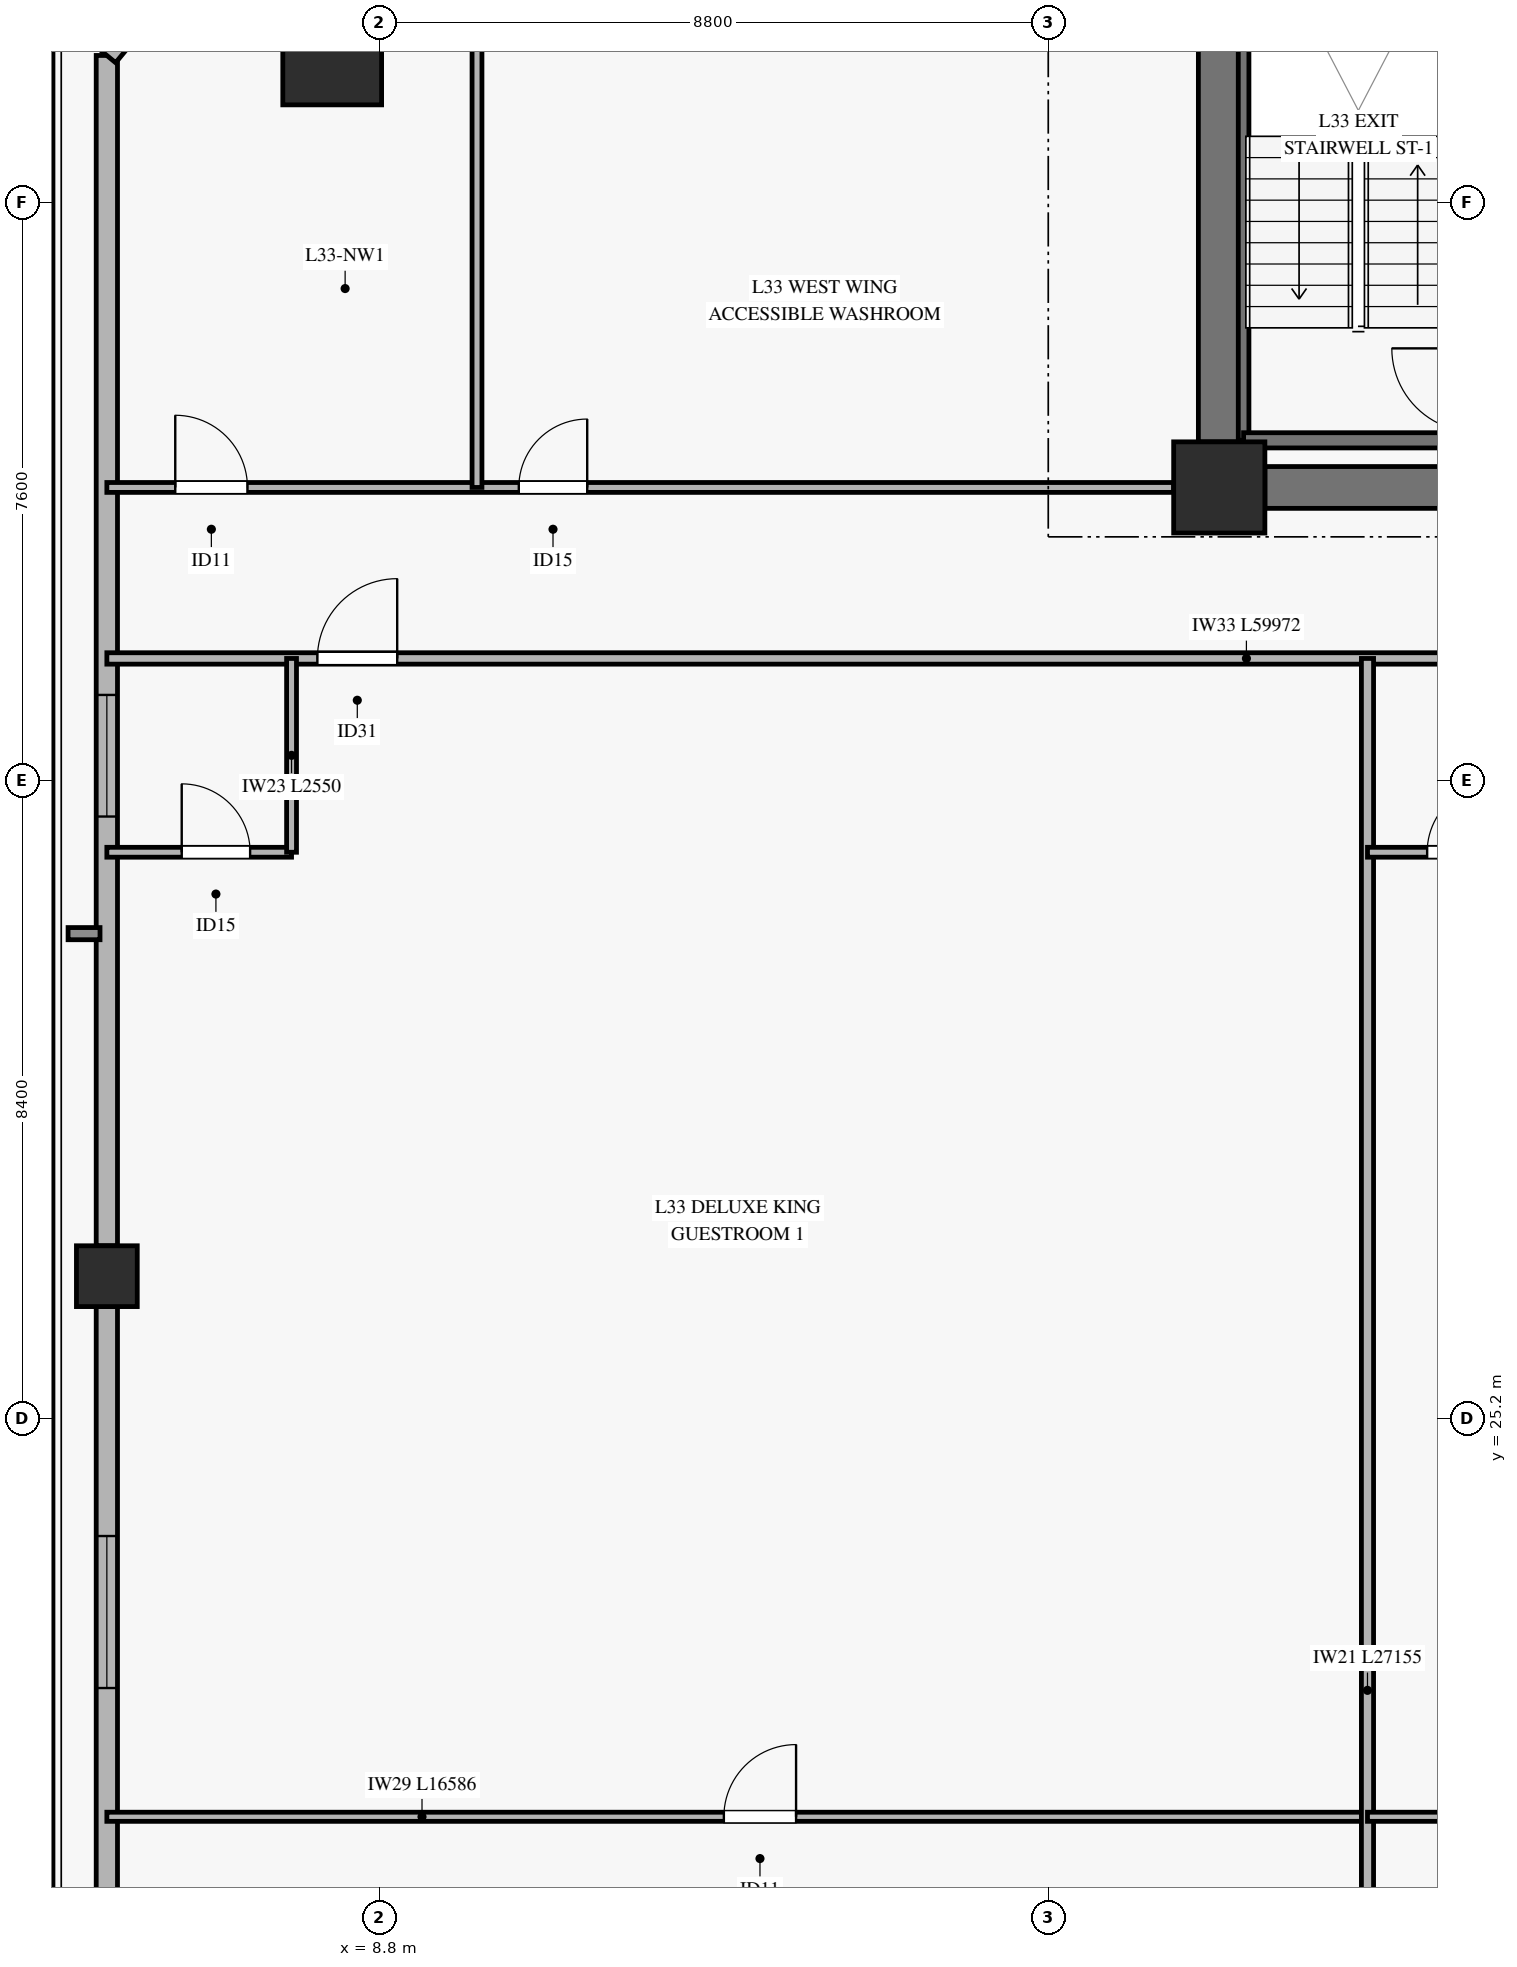
"""IFC4 building model, lengths in metres.
Left out: names, types, materials, properties, quantities, classifications, styles, units other than length and angle.
Written with IfcOpenShell. Run it as: python <this file> out.ifc"""

import sys

from ifc_helpers import new_model, si_unit, direction, frame, frame_2d, origin, origin_2d, place, context, subcontext, project, spatial, rectangle, hollow_rectangle, extrude, source, transform, mapped, element, fill, save


model = new_model("IFC4")
c1 = context("Model", 3, precision=1e-05, world=origin(), true_north=direction((0.0, 1.0)))
c2 = subcontext(c1, "Body", "Model", "MODEL_VIEW")
j1 = project(units=[si_unit("LENGTHUNIT", "METRE"), si_unit("PLANEANGLEUNIT", "RADIAN")], contexts=[c1])
p1 = place(None, origin())
s1 = spatial("IfcSite", under=j1, at=p1, CompositionType="ELEMENT")
p2 = place(p1, origin())
s2 = spatial("IfcBuilding", under=s1, at=p2, CompositionType="ELEMENT")
p3 = place(p2, frame((0.0, 0.0, 137.7)))
s3 = spatial("IfcBuildingStorey", under=s2, at=p3, CompositionType="ELEMENT", Elevation=137.7)
m1 = source(origin(), c2, "Body", "SweptSolid", [
    extrude(rectangle(XDim=1.2, YDim=1.2, at=origin_2d()), origin(), (0.0, 0.0, 1.0), 3.27),
])
p4 = place(p3, frame((19.85, 37.45, 0.0), z_axis=(0.0, 0.0, 1.0), x_axis=(1.0, 0.0, 0.0)))
e1 = element("IfcColumn", 1, at=p4, inside=s3, PredefinedType="PILASTER", context=c2, shape_type="MappedRepresentation", body=[
    mapped(m1, transform((0.0, 0.0, 0.0), x_axis=(1.0, 0.0, 0.0), y_axis=(0.0, 1.0, 0.0), z_axis=(0.0, 0.0, 1.0), scale=1.0)),
])
p5 = place(p3, frame((20.45, 37.45, 0.0), z_axis=(0.0, 0.0, 1.0), x_axis=(1.0, 0.0, 0.0)))
e2 = element("IfcWall", 2, at=p5, inside=s3, PredefinedType="SHEAR", context=c2, shape_type="SweptSolid", body=[
    extrude(rectangle(XDim=9.75, YDim=0.55, at=frame_2d((4.875, 0.0))), origin(), (0.0, 0.0, 1.0), 3.27),
])
p6 = place(p5, frame((4.1, 0.0, 0.0)))
e3 = element("IfcOpeningElement", 3, at=p6, cuts=e2, PredefinedType="OPENING", context=c2, shape_type="SweptSolid", body=[
    extrude(rectangle(XDim=1.2, YDim=2.15, at=frame_2d((0.6, 1.075))), frame((0.0, 0.285, 0.0), z_axis=(0.0, -1.0, 0.0), x_axis=(1.0, 0.0, 0.0)), (0.0, 0.0, 1.0), 0.57),
])
p7 = place(p3, frame((19.85, 38.05, 0.0), z_axis=(0.0, 0.0, 1.0), x_axis=(0.0, 1.0, 0.0)))
e4 = element("IfcWall", 4, at=p7, inside=s3, PredefinedType="SHEAR", context=c2, shape_type="SweptSolid", body=[
    extrude(rectangle(XDim=7.9, YDim=0.55, at=frame_2d((3.95, 0.0))), origin(), (0.0, 0.0, 1.0), 3.27),
])
m2 = source(origin(), c2, "Body", "SweptSolid", [
    extrude(hollow_rectangle(XDim=1.3, YDim=1.3, WallThickness=0.06, at=origin_2d()), origin(), (0.0, 0.0, 1.0), 3.27),
])
p8 = place(p3, frame((8.179, 43.134, 0.0), z_axis=(0.0, 0.0, 1.0), x_axis=(1.0, 0.0, 0.0)))
e5 = element("IfcColumn", 5, at=p8, inside=s3, PredefinedType="COLUMN", context=c2, shape_type="MappedRepresentation", body=[
    mapped(m2, transform((0.0, 0.0, 0.0), x_axis=(1.0, 0.0, 0.0), y_axis=(0.0, 1.0, 0.0), z_axis=(0.0, 0.0, 1.0), scale=1.0)),
])
m3 = source(origin(), c2, "Body", "SweptSolid", [
    extrude(hollow_rectangle(XDim=0.8, YDim=0.8, WallThickness=0.036, at=origin_2d()), origin(), (0.0, 0.0, 1.0), 3.27),
])
p9 = place(p3, frame((5.214, 27.072, 0.0), z_axis=(0.0, 0.0, 1.0), x_axis=(1.0, 0.0, 0.0)))
e6 = element("IfcColumn", 6, at=p9, inside=s3, PredefinedType="COLUMN", context=c2, shape_type="MappedRepresentation", body=[
    mapped(m3, transform((0.0, 0.0, 0.0), x_axis=(1.0, 0.0, 0.0), y_axis=(0.0, 1.0, 0.0), z_axis=(0.0, 0.0, 1.0), scale=1.0)),
])
p10 = place(p3, frame((5.214, 11.01, 0.0), z_axis=(0.0, 0.0, 1.0), x_axis=(0.0, 1.0, 0.0)))
e7 = element("IfcWall", 7, at=p10, inside=s3, PredefinedType="SOLIDWALL", context=c2, shape_type="SweptSolid", body=[
    extrude(rectangle(XDim=15.662, YDim=0.28, at=frame_2d((7.831, 0.0))), origin(), (0.0, 0.0, 1.0), 2.75),
])
p11 = place(p10, frame((3.312, 0.0, 0.45)))
e8 = element("IfcOpeningElement", 8, at=p11, cuts=e7, PredefinedType="OPENING", context=c2, shape_type="SweptSolid", body=[
    extrude(rectangle(XDim=2.0, YDim=2.0, at=frame_2d((1.0, 1.0))), frame((0.0, 0.15, 0.0), z_axis=(0.0, -1.0, 0.0), x_axis=(1.0, 0.0, 0.0)), (0.0, 0.0, 1.0), 0.3),
])
p12 = place(p10, frame((10.643, 0.0, 0.45)))
e9 = element("IfcOpeningElement", 9, at=p12, cuts=e7, PredefinedType="OPENING", context=c2, shape_type="SweptSolid", body=[
    extrude(rectangle(XDim=2.0, YDim=2.0, at=frame_2d((1.0, 1.0))), frame((0.0, 0.15, 0.0), z_axis=(0.0, -1.0, 0.0), x_axis=(1.0, 0.0, 0.0)), (0.0, 0.0, 1.0), 0.3),
])
p13 = place(p3, frame((5.214, 27.472, 0.0), z_axis=(0.0, 0.0, 1.0), x_axis=(0.0, 1.0, 0.0)))
e10 = element("IfcWall", 10, at=p13, inside=s3, PredefinedType="SOLIDWALL", context=c2, shape_type="SweptSolid", body=[
    extrude(rectangle(XDim=15.662, YDim=0.28, at=frame_2d((7.831, 0.0))), origin(), (0.0, 0.0, 1.0), 2.75),
])
p14 = place(p13, frame((5.648, 0.0, 0.45)))
e11 = element("IfcOpeningElement", 11, at=p14, cuts=e10, PredefinedType="OPENING", context=c2, shape_type="SweptSolid", body=[
    extrude(rectangle(XDim=1.6, YDim=2.0, at=frame_2d((0.8, 1.0))), frame((0.0, 0.15, 0.0), z_axis=(0.0, -1.0, 0.0), x_axis=(1.0, 0.0, 0.0)), (0.0, 0.0, 1.0), 0.3),
])
p15 = place(p3, frame((7.779, 46.25, 0.0), z_axis=(0.0, 0.0, 1.0), x_axis=(-0.63553760815, -0.772069911748, 0.0)))
e12 = element("IfcWall", 12, at=p15, inside=s3, PredefinedType="SOLIDWALL", context=c2, shape_type="SweptSolid", body=[
    extrude(rectangle(XDim=4.036, YDim=0.3, at=frame_2d((2.018, 0.0))), origin(), (0.0, 0.0, 1.0), 2.75),
])
p16 = place(p15, frame((1.218, 0.0, 0.45)))
e13 = element("IfcOpeningElement", 13, at=p16, cuts=e12, PredefinedType="OPENING", context=c2, shape_type="SweptSolid", body=[
    extrude(rectangle(XDim=1.6, YDim=2.0, at=frame_2d((0.8, 1.0))), frame((0.0, 0.16, 0.0), z_axis=(0.0, -1.0, 0.0), x_axis=(1.0, 0.0, 0.0)), (0.0, 0.0, 1.0), 0.32),
])
p17 = place(p3, frame((20.17, 38.07, 0.0), z_axis=(0.0, 0.0, 1.0), x_axis=(0.0, 1.0, 0.0)))
e14 = element("IfcWall", 14, at=p17, inside=s3, PredefinedType="SOLIDWALL", context=c2, shape_type="SweptSolid", body=[
    extrude(rectangle(XDim=7.25, YDim=0.14, at=frame_2d((3.625, 0.0))), origin(), (0.0, 0.0, 1.0), 3.5),
])
p18 = place(p3, frame((20.17, 38.07, 0.0), z_axis=(0.0, 0.0, 1.0), x_axis=(1.0, 0.0, 0.0)))
e15 = element("IfcWall", 15, at=p18, inside=s3, PredefinedType="SOLIDWALL", context=c2, shape_type="SweptSolid", body=[
    extrude(rectangle(XDim=3.05, YDim=0.2, at=frame_2d((1.525, 0.0))), origin(), (0.0, 0.0, 1.0), 3.5),
])
p19 = place(p3, frame((5.214, 35.2, 0.0), z_axis=(0.0, 0.0, 1.0), x_axis=(1.0, 0.0, 0.0)))
e16 = element("IfcWall", 16, at=p19, inside=s3, PredefinedType="PARTITIONING", context=c2, shape_type="SweptSolid", body=[
    extrude(rectangle(XDim=59.972, YDim=0.15, at=frame_2d((29.986, 0.0))), origin(), (0.0, 0.0, 1.0), 2.455),
])
p20 = place(p19, frame((2.77, 0.0, 0.0)))
e17 = element("IfcOpeningElement", 17, at=p20, cuts=e16, PredefinedType="OPENING", context=c2, shape_type="SweptSolid", body=[
    extrude(rectangle(XDim=1.05, YDim=2.15, at=frame_2d((0.525, 1.075))), frame((0.0, 0.085, 0.0), z_axis=(0.0, -1.0, 0.0), x_axis=(1.0, 0.0, 0.0)), (0.0, 0.0, 1.0), 0.17),
])
p21 = place(p19, frame((19.156, 0.0, 0.0)))
e18 = element("IfcOpeningElement", 18, at=p21, cuts=e16, PredefinedType="OPENING", context=c2, shape_type="SweptSolid", body=[
    extrude(rectangle(XDim=1.05, YDim=2.15, at=frame_2d((0.525, 1.075))), frame((0.0, 0.085, 0.0), z_axis=(0.0, -1.0, 0.0), x_axis=(1.0, 0.0, 0.0)), (0.0, 0.0, 1.0), 0.17),
])
p22 = place(p19, frame((24.662, 0.0, 0.0)))
e19 = element("IfcOpeningElement", 19, at=p22, cuts=e16, PredefinedType="OPENING", context=c2, shape_type="SweptSolid", body=[
    extrude(rectangle(XDim=1.05, YDim=2.15, at=frame_2d((0.525, 1.075))), frame((0.0, 0.085, 0.0), z_axis=(0.0, -1.0, 0.0), x_axis=(1.0, 0.0, 0.0)), (0.0, 0.0, 1.0), 0.17),
])
p23 = place(p19, frame((29.462, 0.0, 0.0)))
e20 = element("IfcOpeningElement", 20, at=p23, cuts=e16, PredefinedType="OPENING", context=c2, shape_type="SweptSolid", body=[
    extrude(rectangle(XDim=1.05, YDim=2.15, at=frame_2d((0.525, 1.075))), frame((0.0, 0.085, 0.0), z_axis=(0.0, -1.0, 0.0), x_axis=(1.0, 0.0, 0.0)), (0.0, 0.0, 1.0), 0.17),
])
p24 = place(p19, frame((34.262, 0.0, 0.0)))
e21 = element("IfcOpeningElement", 21, at=p24, cuts=e16, PredefinedType="OPENING", context=c2, shape_type="SweptSolid", body=[
    extrude(rectangle(XDim=1.05, YDim=2.15, at=frame_2d((0.525, 1.075))), frame((0.0, 0.085, 0.0), z_axis=(0.0, -1.0, 0.0), x_axis=(1.0, 0.0, 0.0)), (0.0, 0.0, 1.0), 0.17),
])
p25 = place(p19, frame((38.806, 0.0, 0.0)))
e22 = element("IfcOpeningElement", 22, at=p25, cuts=e16, PredefinedType="OPENING", context=c2, shape_type="SweptSolid", body=[
    extrude(rectangle(XDim=1.05, YDim=2.15, at=frame_2d((0.525, 1.075))), frame((0.0, 0.085, 0.0), z_axis=(0.0, -1.0, 0.0), x_axis=(1.0, 0.0, 0.0)), (0.0, 0.0, 1.0), 0.17),
])
p26 = place(p19, frame((42.956, 0.0, 0.0)))
e23 = element("IfcOpeningElement", 23, at=p26, cuts=e16, PredefinedType="OPENING", context=c2, shape_type="SweptSolid", body=[
    extrude(rectangle(XDim=1.05, YDim=2.15, at=frame_2d((0.525, 1.075))), frame((0.0, 0.085, 0.0), z_axis=(0.0, -1.0, 0.0), x_axis=(1.0, 0.0, 0.0)), (0.0, 0.0, 1.0), 0.17),
])
p27 = place(p3, frame((5.214, 32.65, 0.0), z_axis=(0.0, 0.0, 1.0), x_axis=(1.0, 0.0, 0.0)))
e24 = element("IfcWall", 24, at=p27, inside=s3, PredefinedType="PARTITIONING", context=c2, shape_type="SweptSolid", body=[
    extrude(rectangle(XDim=2.43, YDim=0.13, at=frame_2d((1.215, 0.0))), origin(), (0.0, 0.0, 1.0), 2.755),
])
p28 = place(p27, frame((0.985, 0.0, 0.0)))
e25 = element("IfcOpeningElement", 25, at=p28, cuts=e24, PredefinedType="OPENING", context=c2, shape_type="SweptSolid", body=[
    extrude(rectangle(XDim=0.9, YDim=2.1, at=frame_2d((0.45, 1.05))), frame((0.0, 0.075, 0.0), z_axis=(0.0, -1.0, 0.0), x_axis=(1.0, 0.0, 0.0)), (0.0, 0.0, 1.0), 0.15),
])
p29 = place(p3, frame((7.644, 32.65, 0.0), z_axis=(0.0, 0.0, 1.0), x_axis=(0.0, 1.0, 0.0)))
e26 = element("IfcWall", 26, at=p29, inside=s3, PredefinedType="PARTITIONING", context=c2, shape_type="SweptSolid", body=[
    extrude(rectangle(XDim=2.55, YDim=0.13, at=frame_2d((1.275, 0.0))), origin(), (0.0, 0.0, 1.0), 3.27),
])
p30 = place(p3, frame((5.214, 19.959, 0.0), z_axis=(0.0, 0.0, 1.0), x_axis=(1.0, 0.0, 0.0)))
e27 = element("IfcWall", 27, at=p30, inside=s3, PredefinedType="PARTITIONING", context=c2, shape_type="SweptSolid", body=[
    extrude(rectangle(XDim=16.586, YDim=0.12, at=frame_2d((8.293, 0.0))), origin(), (0.0, 0.0, 1.0), 2.455),
])
p31 = place(p30, frame((8.118, 0.0, 0.0)))
e28 = element("IfcOpeningElement", 28, at=p31, cuts=e27, PredefinedType="OPENING", context=c2, shape_type="SweptSolid", body=[
    extrude(rectangle(XDim=0.95, YDim=2.1, at=frame_2d((0.475, 1.05))), frame((0.0, 0.07, 0.0), z_axis=(0.0, -1.0, 0.0), x_axis=(1.0, 0.0, 0.0)), (0.0, 0.0, 1.0), 0.14),
])
p32 = place(p3, frame((21.8, 8.045, 0.0), z_axis=(0.0, 0.0, 1.0), x_axis=(0.0, 1.0, 0.0)))
e29 = element("IfcWall", 29, at=p32, inside=s3, PredefinedType="PARTITIONING", context=c2, shape_type="SweptSolid", body=[
    extrude(rectangle(XDim=27.155, YDim=0.16, at=frame_2d((13.578, 0.0))), origin(), (0.0, 0.0, 1.0), 2.755),
])
p33 = place(p3, frame((21.8, 32.65, 0.0), z_axis=(0.0, 0.0, 1.0), x_axis=(1.0, 0.0, 0.0)))
e30 = element("IfcWall", 30, at=p33, inside=s3, PredefinedType="PARTITIONING", context=c2, shape_type="SweptSolid", body=[
    extrude(rectangle(XDim=2.23, YDim=0.13, at=frame_2d((1.115, 0.0))), origin(), (0.0, 0.0, 1.0), 2.805),
])
p34 = place(p33, frame((0.785, 0.0, 0.0)))
e31 = element("IfcOpeningElement", 31, at=p34, cuts=e30, PredefinedType="OPENING", context=c2, shape_type="SweptSolid", body=[
    extrude(rectangle(XDim=0.9, YDim=2.1, at=frame_2d((0.45, 1.05))), frame((0.0, 0.075, 0.0), z_axis=(0.0, -1.0, 0.0), x_axis=(1.0, 0.0, 0.0)), (0.0, 0.0, 1.0), 0.15),
])
p35 = place(p3, frame((21.8, 19.959, 0.0), z_axis=(0.0, 0.0, 1.0), x_axis=(1.0, 0.0, 0.0)))
e32 = element("IfcWall", 32, at=p35, inside=s3, PredefinedType="PARTITIONING", context=c2, shape_type="SweptSolid", body=[
    extrude(rectangle(XDim=5.8, YDim=0.12, at=frame_2d((2.9, 0.0))), origin(), (0.0, 0.0, 1.0), 3.27),
])
p36 = place(p35, frame((2.625, 0.0, 0.0)))
e33 = element("IfcOpeningElement", 33, at=p36, cuts=e32, PredefinedType="OPENING", context=c2, shape_type="SweptSolid", body=[
    extrude(rectangle(XDim=0.95, YDim=2.1, at=frame_2d((0.475, 1.05))), frame((0.0, 0.07, 0.0), z_axis=(0.0, -1.0, 0.0), x_axis=(1.0, 0.0, 0.0)), (0.0, 0.0, 1.0), 0.14),
])
p37 = place(p3, frame((5.214, 37.45, 0.0), z_axis=(0.0, 0.0, 1.0), x_axis=(1.0, 0.0, 0.0)))
e34 = element("IfcWall", 34, at=p37, inside=s3, PredefinedType="PARTITIONING", context=c2, shape_type="SweptSolid", body=[
    extrude(rectangle(XDim=14.036, YDim=0.13, at=frame_2d((7.018, 0.0))), origin(), (0.0, 0.0, 1.0), 2.755),
])
p38 = place(p37, frame((0.9, 0.0, 0.0)))
e35 = element("IfcOpeningElement", 35, at=p38, cuts=e34, PredefinedType="OPENING", context=c2, shape_type="SweptSolid", body=[
    extrude(rectangle(XDim=0.95, YDim=2.1, at=frame_2d((0.475, 1.05))), frame((0.0, 0.075, 0.0), z_axis=(0.0, -1.0, 0.0), x_axis=(1.0, 0.0, 0.0)), (0.0, 0.0, 1.0), 0.15),
])
p39 = place(p37, frame((5.42, 0.0, 0.0)))
e36 = element("IfcOpeningElement", 36, at=p39, cuts=e34, PredefinedType="OPENING", context=c2, shape_type="SweptSolid", body=[
    extrude(rectangle(XDim=0.9, YDim=2.1, at=frame_2d((0.45, 1.05))), frame((0.0, 0.075, 0.0), z_axis=(0.0, -1.0, 0.0), x_axis=(1.0, 0.0, 0.0)), (0.0, 0.0, 1.0), 0.15),
])
p40 = place(p3, frame((10.084, 37.45, 0.0), z_axis=(0.0, 0.0, 1.0), x_axis=(0.0, 1.0, 0.0)))
e37 = element("IfcWall", 37, at=p40, inside=s3, PredefinedType="PARTITIONING", context=c2, shape_type="SweptSolid", body=[
    extrude(rectangle(XDim=8.8, YDim=0.13, at=frame_2d((4.4, 0.0))), origin(), (0.0, 0.0, 1.0), 3.27),
])
m4 = source(origin(), c2, "Body", "SweptSolid", [
    extrude(rectangle(XDim=2.0, YDim=2.0, at=frame_2d((1.0, 1.0))), frame((0.0, 0.03, 0.0), z_axis=(0.0, -1.0, 0.0), x_axis=(1.0, 0.0, 0.0)), (0.0, 0.0, 1.0), 0.06),
])
p41 = place(p12, origin())
e38 = element("IfcWindow", 38, at=p41, inside=s3, PartitioningType="SINGLE_PANEL", PredefinedType="WINDOW", context=c2, shape_type="MappedRepresentation", body=[
    mapped(m4, transform((0.0, 0.0, 0.0), x_axis=(1.0, 0.0, 0.0), y_axis=(0.0, 1.0, 0.0), z_axis=(0.0, 0.0, 1.0), scale=1.0)),
])
fill(e9, e38)
m5 = source(origin(), c2, "Body", "SweptSolid", [
    extrude(rectangle(XDim=1.6, YDim=2.0, at=frame_2d((0.8, 1.0))), frame((0.0, 0.03, 0.0), z_axis=(0.0, -1.0, 0.0), x_axis=(1.0, 0.0, 0.0)), (0.0, 0.0, 1.0), 0.06),
])
p42 = place(p14, origin())
e39 = element("IfcWindow", 39, at=p42, inside=s3, PartitioningType="SINGLE_PANEL", PredefinedType="WINDOW", context=c2, shape_type="MappedRepresentation", body=[
    mapped(m5, transform((0.0, 0.0, 0.0), x_axis=(1.0, 0.0, 0.0), y_axis=(0.0, 1.0, 0.0), z_axis=(0.0, 0.0, 1.0), scale=1.0)),
])
fill(e11, e39)
m6 = source(origin(), c2, "Body", "SweptSolid", [
    extrude(rectangle(XDim=1.05, YDim=2.15, at=frame_2d((0.525, 1.075))), frame((0.0, 0.025, 0.0), z_axis=(0.0, -1.0, 0.0), x_axis=(1.0, 0.0, 0.0)), (0.0, 0.0, 1.0), 0.05),
])
p43 = place(p20, origin())
e40 = element("IfcDoor", 40, at=p43, inside=s3, OperationType="SINGLE_SWING_RIGHT", PredefinedType="DOOR", context=c2, shape_type="MappedRepresentation", body=[
    mapped(m6, transform((0.0, 0.0, 0.0), x_axis=(1.0, 0.0, 0.0), y_axis=(0.0, 1.0, 0.0), z_axis=(0.0, 0.0, 1.0), scale=1.0)),
])
fill(e17, e40)
m7 = source(origin(), c2, "Body", "SweptSolid", [
    extrude(rectangle(XDim=0.9, YDim=2.1, at=frame_2d((0.45, 1.05))), frame((0.0, 0.025, 0.0), z_axis=(0.0, -1.0, 0.0), x_axis=(1.0, 0.0, 0.0)), (0.0, 0.0, 1.0), 0.05),
])
p44 = place(p28, origin())
e41 = element("IfcDoor", 41, at=p44, inside=s3, OperationType="SINGLE_SWING_LEFT", PredefinedType="DOOR", context=c2, shape_type="MappedRepresentation", body=[
    mapped(m7, transform((0.0, 0.0, 0.0), x_axis=(1.0, 0.0, 0.0), y_axis=(0.0, 1.0, 0.0), z_axis=(0.0, 0.0, 1.0), scale=1.0)),
])
fill(e25, e41)
m8 = source(origin(), c2, "Body", "SweptSolid", [
    extrude(rectangle(XDim=0.95, YDim=2.1, at=frame_2d((0.475, 1.05))), frame((0.0, 0.025, 0.0), z_axis=(0.0, -1.0, 0.0), x_axis=(1.0, 0.0, 0.0)), (0.0, 0.0, 1.0), 0.05),
])
p45 = place(p31, origin())
e42 = element("IfcDoor", 42, at=p45, inside=s3, OperationType="SINGLE_SWING_RIGHT", PredefinedType="DOOR", context=c2, shape_type="MappedRepresentation", body=[
    mapped(m8, transform((0.0, 0.0, 0.0), x_axis=(1.0, 0.0, 0.0), y_axis=(0.0, 1.0, 0.0), z_axis=(0.0, 0.0, 1.0), scale=1.0)),
])
fill(e28, e42)
p46 = place(p34, origin())
e43 = element("IfcDoor", 43, at=p46, inside=s3, OperationType="SINGLE_SWING_RIGHT", PredefinedType="DOOR", context=c2, shape_type="MappedRepresentation", body=[
    mapped(m7, transform((0.0, 0.0, 0.0), x_axis=(1.0, 0.0, 0.0), y_axis=(0.0, 1.0, 0.0), z_axis=(0.0, 0.0, 1.0), scale=1.0)),
])
fill(e31, e43)
p47 = place(p38, origin())
e44 = element("IfcDoor", 44, at=p47, inside=s3, OperationType="SINGLE_SWING_LEFT", PredefinedType="DOOR", context=c2, shape_type="MappedRepresentation", body=[
    mapped(m8, transform((0.0, 0.0, 0.0), x_axis=(1.0, 0.0, 0.0), y_axis=(0.0, 1.0, 0.0), z_axis=(0.0, 0.0, 1.0), scale=1.0)),
])
fill(e35, e44)
p48 = place(p39, origin())
e45 = element("IfcDoor", 45, at=p48, inside=s3, OperationType="SINGLE_SWING_RIGHT", PredefinedType="DOOR", context=c2, shape_type="MappedRepresentation", body=[
    mapped(m7, transform((0.0, 0.0, 0.0), x_axis=(1.0, 0.0, 0.0), y_axis=(0.0, 1.0, 0.0), z_axis=(0.0, 0.0, 1.0), scale=1.0)),
])
fill(e36, e45)
save(model, sys.argv[1])
